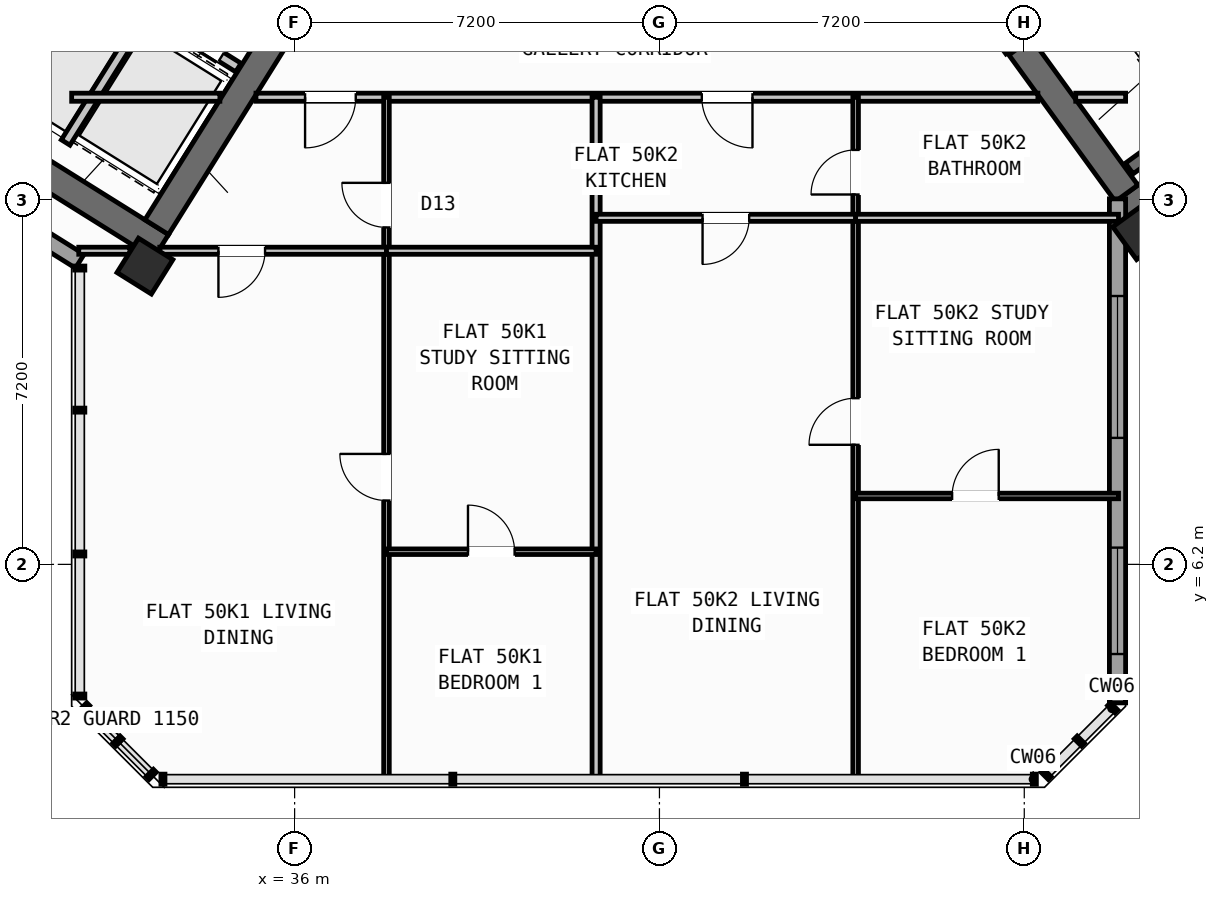
"""IFC4 building model, lengths in metres.
Left out: names, types, materials, properties, quantities, classifications, styles, units other than length and angle.
Written with IfcOpenShell. Run it as: python <this file> out.ifc"""

import sys

from ifc_helpers import new_model, si_unit, direction, frame, frame_2d, origin, origin_2d, place, context, subcontext, project, spatial, rectangle, hollow_rectangle, extrude, source, transform, mapped, element, fill, save


model = new_model("IFC4")
c1 = context("Model", 3, precision=1e-05, world=origin(), true_north=direction((0.0, 1.0)))
c2 = subcontext(c1, "Body", "Model", "MODEL_VIEW")
j1 = project(units=[si_unit("LENGTHUNIT", "METRE"), si_unit("PLANEANGLEUNIT", "RADIAN")], contexts=[c1])
p1 = place(None, origin())
s1 = spatial("IfcSite", under=j1, at=p1, CompositionType="ELEMENT")
p2 = place(p1, origin())
s2 = spatial("IfcBuilding", under=s1, at=p2, CompositionType="ELEMENT")
p3 = place(p2, frame((0.0, 0.0, 199.5)))
s3 = spatial("IfcBuildingStorey", under=s2, at=p3, CompositionType="ELEMENT", Elevation=199.5)
p4 = place(p3, frame((33.366, 12.477, 0.0), z_axis=(0.0, 0.0, 1.0), x_axis=(-0.848047359947, 0.529920442413, 0.0)))
e1 = element("IfcWall", 1, at=p4, inside=s3, PredefinedType="SHEAR", context=c2, shape_type="SweptSolid", body=[
    extrude(rectangle(XDim=13.14, YDim=0.55, at=frame_2d((6.57, 0.0))), origin(), (0.0, 0.0, 1.0), 4.25),
])
p5 = place(p3, frame((36.683, 18.304, 0.0), z_axis=(0.0, 0.0, 1.0), x_axis=(-0.529896466841, -0.848062341122, 0.0)))
e2 = element("IfcWall", 2, at=p5, inside=s3, PredefinedType="SHEAR", context=c2, shape_type="SweptSolid", body=[
    extrude(rectangle(XDim=6.425, YDim=0.55, at=frame_2d((3.212, 0.0))), origin(), (0.0, 0.0, 1.0), 4.25),
])
p6 = place(p3, frame((52.359, 13.14, 0.0), z_axis=(0.0, 0.0, 1.0), x_axis=(0.809014896919, 0.587788139183, 0.0)))
e3 = element("IfcWall", 3, at=p6, inside=s3, PredefinedType="SHEAR", context=c2, shape_type="SweptSolid", body=[
    extrude(rectangle(XDim=12.34, YDim=0.55, at=frame_2d((6.17, 0.0))), origin(), (0.0, 0.0, 1.0), 4.25),
])
p7 = place(p3, frame((52.42, 13.524, 0.0), z_axis=(0.0, 0.0, 1.0), x_axis=(-0.587802113096, 0.809004744015, 0.0)))
e4 = element("IfcWall", 4, at=p7, inside=s3, PredefinedType="SHEAR", context=c2, shape_type="SweptSolid", body=[
    extrude(rectangle(XDim=3.575, YDim=0.55, at=frame_2d((1.788, 0.0))), origin(), (0.0, 0.0, 1.0), 4.25),
])
m1 = source(origin(), c2, "Body", "SweptSolid", [
    extrude(hollow_rectangle(XDim=0.8, YDim=0.8, WallThickness=0.032, at=origin_2d()), origin(), (0.0, 0.0, 1.0), 4.5),
])
for number, where, z_axis, x_axis in (
    (5, (33.046, 12.087, 0.0), (0.0, 0.0, 1.0), (-0.848, 0.53, 0.0)),
    (6, (52.705, 12.773, 0.0), (0.0, 0.0, 1.0), (0.809, 0.588, 0.0)),
):
    element("IfcColumn", number, at=place(p3, frame(where, z_axis=z_axis, x_axis=x_axis)), inside=s3, PredefinedType="COLUMN", context=c2, shape_type="MappedRepresentation", body=[
        mapped(m1, transform((0.0, 0.0, 0.0), scale=1.0)),
    ])
p8 = place(p3, frame((31.76, 12.183, 0.0), z_axis=(0.0, 0.0, 1.0), x_axis=(-0.848047074256, 0.529920899612, 0.0)))
e7 = element("IfcWall", 7, at=p8, inside=s3, PredefinedType="STANDARD", context=c2, shape_type="SweptSolid", body=[
    extrude(rectangle(XDim=30.652, YDim=0.32, at=frame_2d((15.326, 0.0))), origin(), (0.0, 0.0, 1.0), 4.25),
])
p9 = place(p8, frame((15.166, 0.0, 0.0)))
e8 = element("IfcOpeningElement", 8, at=p9, cuts=e7, PredefinedType="OPENING", context=c2, shape_type="SweptSolid", body=[
    extrude(rectangle(XDim=1.2, YDim=2.15, at=frame_2d((0.6, 1.075))), frame((0.0, 0.17, 0.0), z_axis=(0.0, -1.0, 0.0), x_axis=(1.0, 0.0, 0.0)), (0.0, 0.0, 1.0), 0.34),
])
p10 = place(p8, frame((1.665, 0.0, 0.65)))
e9 = element("IfcOpeningElement", 9, at=p10, cuts=e7, PredefinedType="OPENING", context=c2, shape_type="SweptSolid", body=[
    extrude(rectangle(XDim=2.8, YDim=2.1, at=frame_2d((1.4, 1.05))), frame((0.0, 0.17, 0.0), z_axis=(0.0, -1.0, 0.0), x_axis=(1.0, 0.0, 0.0)), (0.0, 0.0, 1.0), 0.34),
])
p11 = place(p8, frame((6.894, 0.0, 0.65)))
e10 = element("IfcOpeningElement", 10, at=p11, cuts=e7, PredefinedType="OPENING", context=c2, shape_type="SweptSolid", body=[
    extrude(rectangle(XDim=2.8, YDim=2.1, at=frame_2d((1.4, 1.05))), frame((0.0, 0.17, 0.0), z_axis=(0.0, -1.0, 0.0), x_axis=(1.0, 0.0, 0.0)), (0.0, 0.0, 1.0), 0.34),
])
p12 = place(p8, frame((20.453, 0.0, 0.85)))
e11 = element("IfcOpeningElement", 11, at=p12, cuts=e7, PredefinedType="OPENING", context=c2, shape_type="SweptSolid", body=[
    extrude(rectangle(XDim=1.5, YDim=1.5, at=frame_2d((0.75, 0.75))), frame((0.0, 0.17, 0.0), z_axis=(0.0, -1.0, 0.0), x_axis=(1.0, 0.0, 0.0)), (0.0, 0.0, 1.0), 0.34),
])
p13 = place(p8, frame((26.258, 0.0, 0.65)))
e12 = element("IfcOpeningElement", 12, at=p13, cuts=e7, PredefinedType="OPENING", context=c2, shape_type="SweptSolid", body=[
    extrude(rectangle(XDim=2.8, YDim=2.1, at=frame_2d((1.4, 1.05))), frame((0.0, 0.17, 0.0), z_axis=(0.0, -1.0, 0.0), x_axis=(1.0, 0.0, 0.0)), (0.0, 0.0, 1.0), 0.34),
])
p14 = place(p3, frame((52.24, 13.414, 0.0), z_axis=(0.0, 0.0, 1.0), x_axis=(0.0, -1.0, 0.0)))
e13 = element("IfcWall", 13, at=p14, inside=s3, PredefinedType="STANDARD", context=c2, shape_type="SweptSolid", body=[
    extrude(rectangle(XDim=9.948, YDim=0.32, at=frame_2d((4.974, 0.0))), origin(), (0.0, 0.0, 1.0), 4.25),
])
p15 = place(p14, frame((1.917, 0.0, 0.65)))
e14 = element("IfcOpeningElement", 14, at=p15, cuts=e13, PredefinedType="OPENING", context=c2, shape_type="SweptSolid", body=[
    extrude(rectangle(XDim=2.8, YDim=2.1, at=frame_2d((1.4, 1.05))), frame((0.0, 0.17, 0.0), z_axis=(0.0, -1.0, 0.0), x_axis=(1.0, 0.0, 0.0)), (0.0, 0.0, 1.0), 0.34),
])
p16 = place(p14, frame((6.883, 0.0, 0.8)))
e15 = element("IfcOpeningElement", 15, at=p16, cuts=e13, PredefinedType="OPENING", context=c2, shape_type="SweptSolid", body=[
    extrude(rectangle(XDim=2.1, YDim=1.55, at=frame_2d((1.05, 0.775))), frame((0.0, 0.17, 0.0), z_axis=(0.0, -1.0, 0.0), x_axis=(1.0, 0.0, 0.0)), (0.0, 0.0, 1.0), 0.34),
])
p17 = place(p3, frame((31.288, 18.256, 0.0), z_axis=(0.0, 0.0, 1.0), x_axis=(-0.529943379326, -0.848033026897, 0.0)))
e16 = element("IfcWall", 16, at=p17, inside=s3, PredefinedType="SHEAR", context=c2, shape_type="SweptSolid", body=[
    extrude(rectangle(XDim=3.16, YDim=0.26, at=frame_2d((1.58, 0.0))), origin(), (0.0, 0.0, 1.0), 4.25),
])
p18 = place(p3, frame((34.891, 16.005, 0.0), z_axis=(0.0, 0.0, 1.0), x_axis=(-0.848062873452, 0.529895614884, 0.0)))
e17 = element("IfcWall", 17, at=p18, inside=s3, PredefinedType="STANDARD", context=c2, shape_type="SweptSolid", body=[
    extrude(rectangle(XDim=4.248, YDim=0.2, at=frame_2d((2.124, 0.0))), origin(), (0.0, 0.0, 1.0), 4.24),
])
p19 = place(p18, frame((0.398, 0.0, 0.0)))
e18 = element("IfcOpeningElement", 18, at=p19, cuts=e17, PredefinedType="OPENING", context=c2, shape_type="SweptSolid", body=[
    extrude(rectangle(XDim=1.3, YDim=2.2, at=frame_2d((0.65, 1.1))), frame((0.0, 0.11, 0.0), z_axis=(0.0, -1.0, 0.0), x_axis=(1.0, 0.0, 0.0)), (0.0, 0.0, 1.0), 0.22),
])
p20 = place(p18, frame((2.473, 0.0, 0.0)))
e19 = element("IfcOpeningElement", 19, at=p20, cuts=e17, PredefinedType="OPENING", context=c2, shape_type="SweptSolid", body=[
    extrude(rectangle(XDim=1.45, YDim=2.25, at=frame_2d((0.725, 1.125))), frame((0.0, 0.11, 0.0), z_axis=(0.0, -1.0, 0.0), x_axis=(1.0, 0.0, 0.0)), (0.0, 0.0, 1.0), 0.22),
])
p21 = place(p3, frame((33.029, 17.003, 0.0), z_axis=(0.0, 0.0, 1.0), x_axis=(-0.529916267533, -0.848049968695, 0.0)))
e20 = element("IfcWall", 20, at=p21, inside=s3, PredefinedType="STANDARD", context=c2, shape_type="SweptSolid", body=[
    extrude(rectangle(XDim=2.92, YDim=0.2, at=frame_2d((1.46, 0.0))), origin(), (0.0, 0.0, 1.0), 4.24),
])
p22 = place(p3, frame((52.472, 14.013, 0.0), z_axis=(0.0, 0.0, 1.0), x_axis=(0.809028366311, 0.587769599847, 0.0)))
e21 = element("IfcWall", 21, at=p22, inside=s3, PredefinedType="SHEAR", context=c2, shape_type="SweptSolid", body=[
    extrude(rectangle(XDim=7.33, YDim=0.26, at=frame_2d((3.665, 0.0))), origin(), (0.0, 0.0, 1.0), 4.25),
])
p23 = place(p3, frame((31.6, 15.42, 0.0), z_axis=(0.0, 0.0, 1.0), x_axis=(1.0, 0.0, 0.0)))
e22 = element("IfcWall", 22, at=p23, inside=s3, PredefinedType="PARTITIONING", context=c2, shape_type="SweptSolid", body=[
    extrude(rectangle(XDim=2.925, YDim=0.16, at=frame_2d((1.462, 0.0))), origin(), (0.0, 0.0, 1.0), 4.24),
])
p24 = place(p3, frame((35.237, 15.42, 0.0), z_axis=(0.0, 0.0, 1.0), x_axis=(1.0, 0.0, 0.0)))
e23 = element("IfcWall", 23, at=p24, inside=s3, PredefinedType="PARTITIONING", context=c2, shape_type="SweptSolid", body=[
    extrude(rectangle(XDim=15.432, YDim=0.16, at=frame_2d((7.716, 0.0))), origin(), (0.0, 0.0, 1.0), 4.24),
])
p25 = place(p24, frame((0.969, 0.0, 0.0)))
e24 = element("IfcOpeningElement", 24, at=p25, cuts=e23, PredefinedType="OPENING", context=c2, shape_type="SweptSolid", body=[
    extrude(rectangle(XDim=1.0, YDim=2.1, at=frame_2d((0.5, 1.05))), frame((0.0, 0.09, 0.0), z_axis=(0.0, -1.0, 0.0), x_axis=(1.0, 0.0, 0.0)), (0.0, 0.0, 1.0), 0.18),
])
p26 = place(p24, frame((8.799, 0.0, 0.0)))
e25 = element("IfcOpeningElement", 25, at=p26, cuts=e23, PredefinedType="OPENING", context=c2, shape_type="SweptSolid", body=[
    extrude(rectangle(XDim=1.0, YDim=2.1, at=frame_2d((0.5, 1.05))), frame((0.0, 0.09, 0.0), z_axis=(0.0, -1.0, 0.0), x_axis=(1.0, 0.0, 0.0)), (0.0, 0.0, 1.0), 0.18),
])
p27 = place(p3, frame((51.416, 15.42, 0.0), z_axis=(0.0, 0.0, 1.0), x_axis=(1.0, 0.0, 0.0)))
e26 = element("IfcWall", 26, at=p27, inside=s3, PredefinedType="PARTITIONING", context=c2, shape_type="SweptSolid", body=[
    extrude(rectangle(XDim=0.984, YDim=0.16, at=frame_2d((0.492, 0.0))), origin(), (0.0, 0.0, 1.0), 4.24),
])
p28 = place(p3, frame((50.119, 16.333, 0.0), z_axis=(0.0, 0.0, 1.0), x_axis=(-0.587749856981, 0.809042709391, 0.0)))
e27 = element("IfcWall", 27, at=p28, inside=s3, PredefinedType="STANDARD", context=c2, shape_type="SweptSolid", body=[
    extrude(rectangle(XDim=2.96, YDim=0.2, at=frame_2d((1.48, 0.0))), origin(), (0.0, 0.0, 1.0), 4.24),
])
p29 = place(p28, frame((0.53, 0.0, 0.0)))
e28 = element("IfcOpeningElement", 28, at=p29, cuts=e27, PredefinedType="OPENING", context=c2, shape_type="SweptSolid", body=[
    extrude(rectangle(XDim=1.5, YDim=2.15, at=frame_2d((0.75, 1.075))), frame((0.0, 0.11, 0.0), z_axis=(0.0, -1.0, 0.0), x_axis=(1.0, 0.0, 0.0)), (0.0, 0.0, 1.0), 0.22),
])
p30 = place(p3, frame((41.95, 1.96, 0.0), z_axis=(0.0, 0.0, 1.0), x_axis=(0.0, 1.0, 0.0)))
e29 = element("IfcWall", 29, at=p30, inside=s3, PredefinedType="PARTITIONING", context=c2, shape_type="SweptSolid", body=[
    extrude(rectangle(XDim=13.46, YDim=0.16, at=frame_2d((6.73, 0.0))), origin(), (0.0, 0.0, 1.0), 4.24),
])
p31 = place(p3, frame((37.813, 1.96, 0.0), z_axis=(0.0, 0.0, 1.0), x_axis=(0.0, 1.0, 0.0)))
e30 = element("IfcWall", 30, at=p31, inside=s3, PredefinedType="PARTITIONING", context=c2, shape_type="SweptSolid", body=[
    extrude(rectangle(XDim=13.46, YDim=0.11, at=frame_2d((6.73, 0.0))), origin(), (0.0, 0.0, 1.0), 4.24),
])
p32 = place(p31, frame((5.5, 0.0, 0.0)))
e31 = element("IfcOpeningElement", 31, at=p32, cuts=e30, PredefinedType="OPENING", context=c2, shape_type="SweptSolid", body=[
    extrude(rectangle(XDim=0.92, YDim=2.08, at=frame_2d((0.46, 1.04))), frame((0.0, 0.065, 0.0), z_axis=(0.0, -1.0, 0.0), x_axis=(1.0, 0.0, 0.0)), (0.0, 0.0, 1.0), 0.13),
])
p33 = place(p31, frame((10.89, 0.0, 0.0)))
e32 = element("IfcOpeningElement", 32, at=p33, cuts=e30, PredefinedType="OPENING", context=c2, shape_type="SweptSolid", body=[
    extrude(rectangle(XDim=0.88, YDim=2.08, at=frame_2d((0.44, 1.04))), frame((0.0, 0.065, 0.0), z_axis=(0.0, -1.0, 0.0), x_axis=(1.0, 0.0, 0.0)), (0.0, 0.0, 1.0), 0.13),
])
p34 = place(p3, frame((31.74, 12.39, 0.0), z_axis=(0.0, 0.0, 1.0), x_axis=(1.0, 0.0, 0.0)))
e33 = element("IfcWall", 33, at=p34, inside=s3, PredefinedType="PLUMBINGWALL", context=c2, shape_type="SweptSolid", body=[
    extrude(rectangle(XDim=1.01, YDim=0.14, at=frame_2d((0.505, 0.0))), origin(), (0.0, 0.0, 1.0), 4.24),
])
p35 = place(p3, frame((33.339, 12.39, 0.0), z_axis=(0.0, 0.0, 1.0), x_axis=(1.0, 0.0, 0.0)))
e34 = element("IfcWall", 34, at=p35, inside=s3, PredefinedType="PLUMBINGWALL", context=c2, shape_type="SweptSolid", body=[
    extrude(rectangle(XDim=4.474, YDim=0.14, at=frame_2d((2.237, 0.0))), origin(), (0.0, 0.0, 1.0), 3.425),
])
p36 = place(p35, frame((1.158, 0.0, 0.0)))
e35 = element("IfcOpeningElement", 35, at=p36, cuts=e34, PredefinedType="OPENING", context=c2, shape_type="SweptSolid", body=[
    extrude(rectangle(XDim=0.92, YDim=2.08, at=frame_2d((0.46, 1.04))), frame((0.0, 0.08, 0.0), z_axis=(0.0, -1.0, 0.0), x_axis=(1.0, 0.0, 0.0)), (0.0, 0.0, 1.0), 0.16),
])
p37 = place(p3, frame((37.813, 12.39, 0.0), z_axis=(0.0, 0.0, 1.0), x_axis=(1.0, 0.0, 0.0)))
e36 = element("IfcWall", 36, at=p37, inside=s3, PredefinedType="PLUMBINGWALL", context=c2, shape_type="SweptSolid", body=[
    extrude(rectangle(XDim=4.137, YDim=0.14, at=frame_2d((2.068, 0.0))), origin(), (0.0, 0.0, 1.0), 3.425),
])
p38 = place(p3, frame((37.813, 6.45, 0.0), z_axis=(0.0, 0.0, 1.0), x_axis=(1.0, 0.0, 0.0)))
e37 = element("IfcWall", 37, at=p38, inside=s3, PredefinedType="PARTITIONING", context=c2, shape_type="SweptSolid", body=[
    extrude(rectangle(XDim=4.137, YDim=0.11, at=frame_2d((2.068, 0.0))), origin(), (0.0, 0.0, 1.0), 4.24),
])
p39 = place(p38, frame((1.608, 0.0, 0.0)))
e38 = element("IfcOpeningElement", 38, at=p39, cuts=e37, PredefinedType="OPENING", context=c2, shape_type="SweptSolid", body=[
    extrude(rectangle(XDim=0.92, YDim=2.08, at=frame_2d((0.46, 1.04))), frame((0.0, 0.065, 0.0), z_axis=(0.0, -1.0, 0.0), x_axis=(1.0, 0.0, 0.0)), (0.0, 0.0, 1.0), 0.13),
])
p40 = place(p3, frame((47.072, 1.96, 0.0), z_axis=(0.0, 0.0, 1.0), x_axis=(0.0, 1.0, 0.0)))
e39 = element("IfcWall", 39, at=p40, inside=s3, PredefinedType="PARTITIONING", context=c2, shape_type="SweptSolid", body=[
    extrude(rectangle(XDim=13.46, YDim=0.11, at=frame_2d((6.73, 0.0))), origin(), (0.0, 0.0, 1.0), 4.24),
])
p41 = place(p40, frame((6.6, 0.0, 0.0)))
e40 = element("IfcOpeningElement", 40, at=p41, cuts=e39, PredefinedType="OPENING", context=c2, shape_type="SweptSolid", body=[
    extrude(rectangle(XDim=0.92, YDim=2.08, at=frame_2d((0.46, 1.04))), frame((0.0, 0.065, 0.0), z_axis=(0.0, -1.0, 0.0), x_axis=(1.0, 0.0, 0.0)), (0.0, 0.0, 1.0), 0.13),
])
p42 = place(p40, frame((11.54, 0.0, 0.0)))
e41 = element("IfcOpeningElement", 41, at=p42, cuts=e39, PredefinedType="OPENING", context=c2, shape_type="SweptSolid", body=[
    extrude(rectangle(XDim=0.88, YDim=2.08, at=frame_2d((0.44, 1.04))), frame((0.0, 0.065, 0.0), z_axis=(0.0, -1.0, 0.0), x_axis=(1.0, 0.0, 0.0)), (0.0, 0.0, 1.0), 0.13),
])
p43 = place(p3, frame((41.95, 13.04, 0.0), z_axis=(0.0, 0.0, 1.0), x_axis=(1.0, 0.0, 0.0)))
e42 = element("IfcWall", 42, at=p43, inside=s3, PredefinedType="PLUMBINGWALL", context=c2, shape_type="SweptSolid", body=[
    extrude(rectangle(XDim=5.122, YDim=0.14, at=frame_2d((2.561, 0.0))), origin(), (0.0, 0.0, 1.0), 4.24),
])
p44 = place(p43, frame((2.101, 0.0, 0.0)))
e43 = element("IfcOpeningElement", 43, at=p44, cuts=e42, PredefinedType="OPENING", context=c2, shape_type="SweptSolid", body=[
    extrude(rectangle(XDim=0.92, YDim=2.08, at=frame_2d((0.46, 1.04))), frame((0.0, 0.08, 0.0), z_axis=(0.0, -1.0, 0.0), x_axis=(1.0, 0.0, 0.0)), (0.0, 0.0, 1.0), 0.16),
])
p45 = place(p3, frame((47.072, 13.04, 0.0), z_axis=(0.0, 0.0, 1.0), x_axis=(1.0, 0.0, 0.0)))
e44 = element("IfcWall", 44, at=p45, inside=s3, PredefinedType="PLUMBINGWALL", context=c2, shape_type="SweptSolid", body=[
    extrude(rectangle(XDim=5.188, YDim=0.14, at=frame_2d((2.594, 0.0))), origin(), (0.0, 0.0, 1.0), 3.425),
])
p46 = place(p3, frame((47.072, 7.55, 0.0), z_axis=(0.0, 0.0, 1.0), x_axis=(1.0, 0.0, 0.0)))
e45 = element("IfcWall", 45, at=p46, inside=s3, PredefinedType="PARTITIONING", context=c2, shape_type="SweptSolid", body=[
    extrude(rectangle(XDim=5.188, YDim=0.11, at=frame_2d((2.594, 0.0))), origin(), (0.0, 0.0, 1.0), 4.24),
])
p47 = place(p46, frame((1.904, 0.0, 0.0)))
e46 = element("IfcOpeningElement", 46, at=p47, cuts=e45, PredefinedType="OPENING", context=c2, shape_type="SweptSolid", body=[
    extrude(rectangle(XDim=0.92, YDim=2.08, at=frame_2d((0.46, 1.04))), frame((0.0, 0.065, 0.0), z_axis=(0.0, -1.0, 0.0), x_axis=(1.0, 0.0, 0.0)), (0.0, 0.0, 1.0), 0.13),
])
m2 = source(origin(), c2, "Body", "SweptSolid", [
    extrude(rectangle(XDim=2.8, YDim=2.1, at=frame_2d((1.4, 1.05))), frame((0.0, 0.03, 0.0), z_axis=(0.0, -1.0, 0.0), x_axis=(1.0, 0.0, 0.0)), (0.0, 0.0, 1.0), 0.06),
])
p48 = place(p15, origin())
e47 = element("IfcWindow", 47, at=p48, inside=s3, PartitioningType="SINGLE_PANEL", PredefinedType="WINDOW", context=c2, shape_type="MappedRepresentation", body=[
    mapped(m2, transform((0.0, 0.0, 0.0), scale=1.0)),
])
fill(e14, e47)
m3 = source(origin(), c2, "Body", "SweptSolid", [
    extrude(rectangle(XDim=2.1, YDim=1.55, at=frame_2d((1.05, 0.775))), frame((0.0, 0.03, 0.0), z_axis=(0.0, -1.0, 0.0), x_axis=(1.0, 0.0, 0.0)), (0.0, 0.0, 1.0), 0.06),
])
p49 = place(p16, origin())
e48 = element("IfcWindow", 48, at=p49, inside=s3, PartitioningType="SINGLE_PANEL", PredefinedType="WINDOW", context=c2, shape_type="MappedRepresentation", body=[
    mapped(m3, transform((0.0, 0.0, 0.0), scale=1.0)),
])
fill(e15, e48)
m4 = source(origin(), c2, "Body", "SweptSolid", [
    extrude(rectangle(XDim=1.3, YDim=2.2, at=frame_2d((0.65, 1.1))), frame((0.0, 0.025, 0.0), z_axis=(0.0, -1.0, 0.0), x_axis=(1.0, 0.0, 0.0)), (0.0, 0.0, 1.0), 0.05),
])
p50 = place(p19, origin())
e49 = element("IfcDoor", 49, at=p50, inside=s3, OperationType="DOUBLE_DOOR_SLIDING", PredefinedType="DOOR", context=c2, shape_type="MappedRepresentation", body=[
    mapped(m4, transform((0.0, 0.0, 0.0), scale=1.0)),
])
fill(e18, e49)
m5 = source(origin(), c2, "Body", "SweptSolid", [
    extrude(rectangle(XDim=0.92, YDim=2.08, at=frame_2d((0.46, 1.04))), frame((0.0, 0.025, 0.0), z_axis=(0.0, -1.0, 0.0), x_axis=(1.0, 0.0, 0.0)), (0.0, 0.0, 1.0), 0.05),
])
p51 = place(p32, origin())
e50 = element("IfcDoor", 50, at=p51, inside=s3, OperationType="SINGLE_SWING_RIGHT", PredefinedType="DOOR", context=c2, shape_type="MappedRepresentation", body=[
    mapped(m5, transform((0.0, 0.0, 0.0), scale=1.0)),
])
fill(e31, e50)
p52 = place(p39, origin())
e51 = element("IfcDoor", 51, at=p52, inside=s3, OperationType="SINGLE_SWING_LEFT", PredefinedType="DOOR", context=c2, shape_type="MappedRepresentation", body=[
    mapped(m5, transform((0.0, 0.0, 0.0), scale=1.0)),
])
fill(e38, e51)
m6 = source(origin(), c2, "Body", "SweptSolid", [
    extrude(rectangle(XDim=1.0, YDim=2.1, at=frame_2d((0.5, 1.05))), frame((0.0, 0.025, 0.0), z_axis=(0.0, -1.0, 0.0), x_axis=(1.0, 0.0, 0.0)), (0.0, 0.0, 1.0), 0.05),
])
p53 = place(p25, frame((1.0, 0.0, 0.0), z_axis=(0.0, 0.0, 1.0), x_axis=(-1.0, 0.0, 0.0)))
e52 = element("IfcDoor", 52, at=p53, inside=s3, OperationType="SINGLE_SWING_RIGHT", PredefinedType="DOOR", context=c2, shape_type="MappedRepresentation", body=[
    mapped(m6, transform((0.0, 0.0, 0.0), scale=1.0)),
])
fill(e24, e52)
p54 = place(p36, frame((0.92, 0.0, 0.0), z_axis=(0.0, 0.0, 1.0), x_axis=(-1.0, 0.0, 0.0)))
e53 = element("IfcDoor", 53, at=p54, inside=s3, OperationType="SINGLE_SWING_RIGHT", PredefinedType="DOOR", context=c2, shape_type="MappedRepresentation", body=[
    mapped(m5, transform((0.0, 0.0, 0.0), scale=1.0)),
])
fill(e35, e53)
m7 = source(origin(), c2, "Body", "SweptSolid", [
    extrude(rectangle(XDim=0.88, YDim=2.08, at=frame_2d((0.44, 1.04))), frame((0.0, 0.025, 0.0), z_axis=(0.0, -1.0, 0.0), x_axis=(1.0, 0.0, 0.0)), (0.0, 0.0, 1.0), 0.05),
])
p55 = place(p33, origin())
e54 = element("IfcDoor", 54, at=p55, inside=s3, OperationType="SINGLE_SWING_RIGHT", PredefinedType="DOOR", context=c2, shape_type="MappedRepresentation", body=[
    mapped(m7, transform((0.0, 0.0, 0.0), scale=1.0)),
])
fill(e32, e54)
p56 = place(p41, origin())
e55 = element("IfcDoor", 55, at=p56, inside=s3, OperationType="SINGLE_SWING_LEFT", PredefinedType="DOOR", context=c2, shape_type="MappedRepresentation", body=[
    mapped(m5, transform((0.0, 0.0, 0.0), scale=1.0)),
])
fill(e40, e55)
p57 = place(p47, origin())
e56 = element("IfcDoor", 56, at=p57, inside=s3, OperationType="SINGLE_SWING_RIGHT", PredefinedType="DOOR", context=c2, shape_type="MappedRepresentation", body=[
    mapped(m5, transform((0.0, 0.0, 0.0), scale=1.0)),
])
fill(e46, e56)
p58 = place(p26, frame((1.0, 0.0, 0.0), z_axis=(0.0, 0.0, 1.0), x_axis=(-1.0, 0.0, 0.0)))
e57 = element("IfcDoor", 57, at=p58, inside=s3, OperationType="SINGLE_SWING_LEFT", PredefinedType="DOOR", context=c2, shape_type="MappedRepresentation", body=[
    mapped(m6, transform((0.0, 0.0, 0.0), scale=1.0)),
])
fill(e25, e57)
p59 = place(p44, frame((0.92, 0.0, 0.0), z_axis=(0.0, 0.0, 1.0), x_axis=(-1.0, 0.0, 0.0)))
e58 = element("IfcDoor", 58, at=p59, inside=s3, OperationType="SINGLE_SWING_RIGHT", PredefinedType="DOOR", context=c2, shape_type="MappedRepresentation", body=[
    mapped(m5, transform((0.0, 0.0, 0.0), scale=1.0)),
])
fill(e43, e58)
p60 = place(p42, origin())
e59 = element("IfcDoor", 59, at=p60, inside=s3, OperationType="SINGLE_SWING_LEFT", PredefinedType="DOOR", context=c2, shape_type="MappedRepresentation", body=[
    mapped(m7, transform((0.0, 0.0, 0.0), scale=1.0)),
])
fill(e41, e59)
save(model, sys.argv[1])
